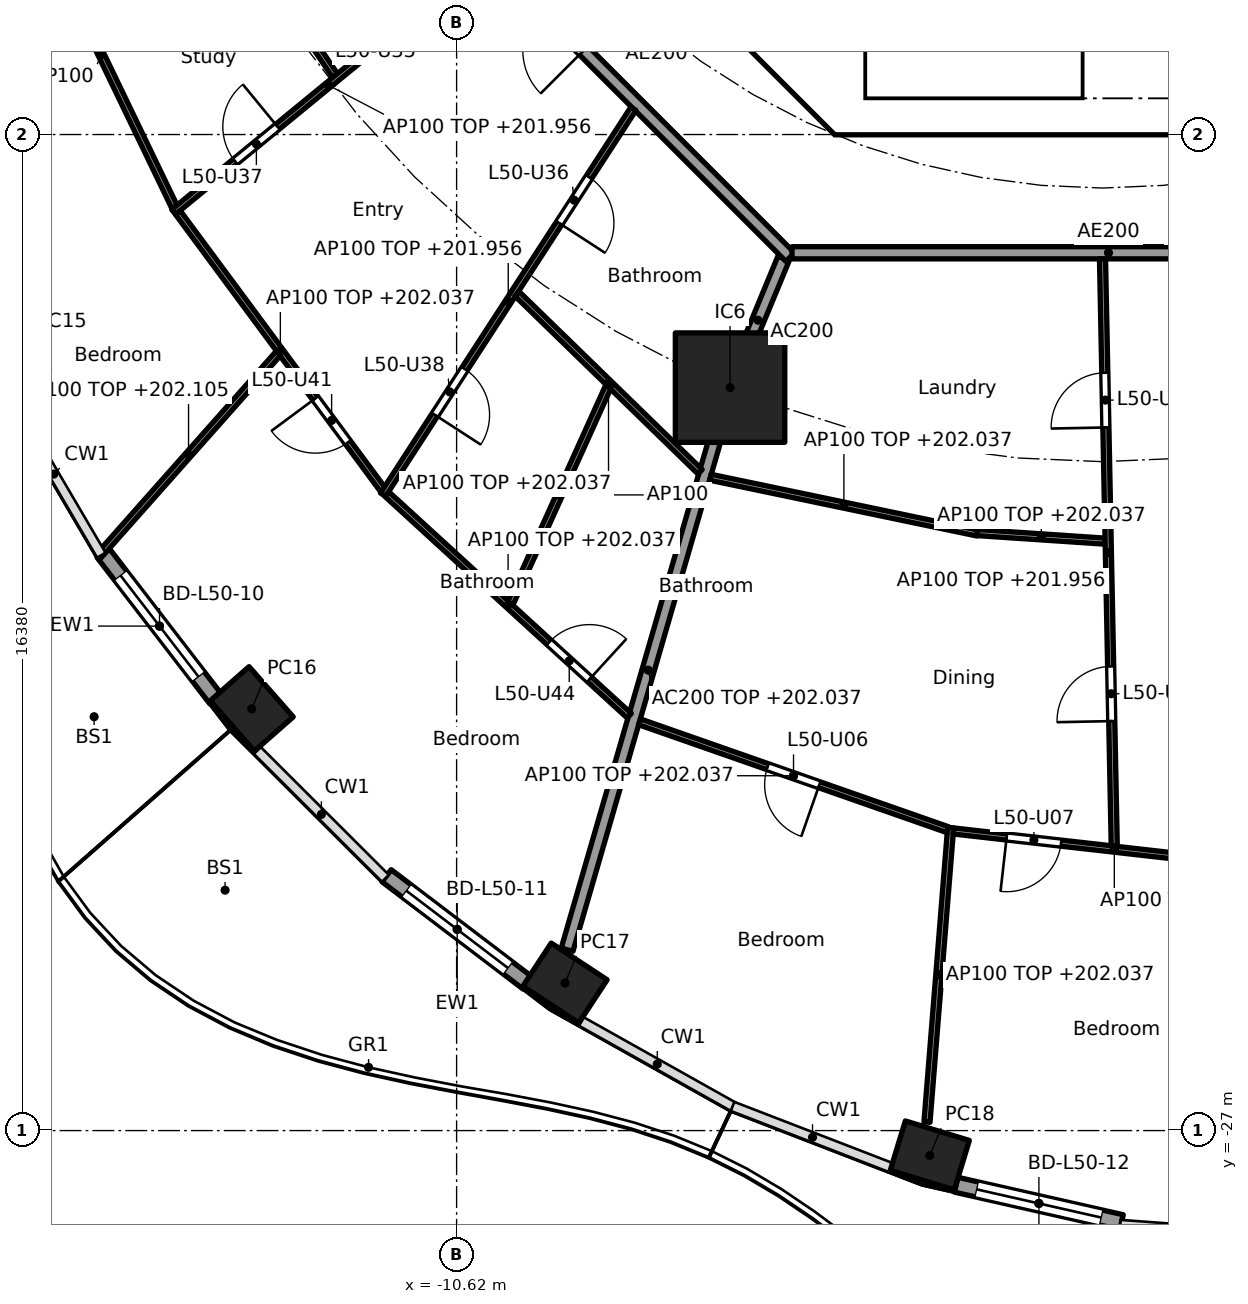
"""IFC4 building model, lengths in metres.
Left out: names, types, materials, properties, quantities, classifications, styles, units other than length and angle.
Written with IfcOpenShell. Run it as: python <this file> out.ifc"""

import sys

from ifc_helpers import new_model, si_unit, direction, frame, frame_2d, origin, origin_2d, place, context, subcontext, project, spatial, polyline, rectangle, hollow_rectangle, outline, extrude, element, fill, save


model = new_model("IFC4")
c1 = context("Model", 3, precision=1e-05, world=origin(), true_north=direction((0.0, 1.0)))
c2 = subcontext(c1, "Body", "Model", "MODEL_VIEW")
j1 = project(units=[si_unit("LENGTHUNIT", "METRE"), si_unit("PLANEANGLEUNIT", "RADIAN")], contexts=[c1])
p1 = place(None, origin())
s1 = spatial("IfcSite", under=j1, at=p1, CompositionType="ELEMENT")
p2 = place(p1, origin())
s2 = spatial("IfcBuilding", under=s1, at=p2, CompositionType="ELEMENT")
p3 = place(p2, frame((0.0, 0.0, 199.2)))
s3 = spatial("IfcBuildingStorey", under=s2, at=p3, CompositionType="ELEMENT", Elevation=199.2)
for number, where, z_axis, x_axis in (
    (1, (-13.989, -20.064, 0.0), (0.0, 0.0, 1.0), (0.66, -0.751, 0.0)),
    (2, (-8.837, -24.573, 0.0), (0.0, 0.0, 1.0), (0.836, -0.549, 0.0)),
    (3, (-2.838, -27.408, 0.0), (0.0, 0.0, 1.0), (0.957, -0.292, 0.0)),
):
    element("IfcColumn", number, at=place(p3, frame(where, z_axis=z_axis, x_axis=x_axis)), inside=s3, PredefinedType="COLUMN", context=c2, shape_type="SweptSolid", body=[
        extrude(hollow_rectangle(XDim=1.1, YDim=0.85, WallThickness=0.036, at=origin_2d()), origin(), (0.0, 0.0, 1.0), 3.7),
    ])
p4 = place(p3, frame((-6.123, -14.782, 0.0), z_axis=(0.0, 0.0, 1.0), x_axis=(1.0, 0.0, 0.0)))
e4 = element("IfcColumn", 4, at=p4, inside=s3, PredefinedType="COLUMN", context=c2, shape_type="SweptSolid", body=[
    extrude(rectangle(XDim=1.8, YDim=1.8, at=origin_2d()), origin(), (0.0, 0.0, 1.0), 3.7),
])
p5 = place(p3, frame((-14.58, -19.906, 0.0), z_axis=(0.0, 0.0, 1.0), x_axis=(-0.610437428894, 0.79206448311, 0.0)))
e5 = element("IfcWall", 5, at=p5, inside=s3, PredefinedType="SOLIDWALL", context=c2, shape_type="SweptSolid", body=[
    extrude(rectangle(XDim=3.035, YDim=0.25, at=frame_2d((1.518, 0.0))), origin(), (0.0, 0.0, 1.0), 3.44),
])
p6 = place(p5, frame((0.468, 0.0, 0.0)))
e6 = element("IfcOpeningElement", 6, at=p6, cuts=e5, PredefinedType="OPENING", context=c2, shape_type="SweptSolid", body=[
    extrude(rectangle(XDim=2.1, YDim=2.4, at=frame_2d((1.05, 1.2))), frame((0.0, 0.135, 0.0), z_axis=(0.0, -1.0, 0.0), x_axis=(1.0, 0.0, 0.0)), (0.0, 0.0, 1.0), 0.27),
])
p7 = place(p3, frame((-9.45, -24.574, 0.0), z_axis=(0.0, 0.0, 1.0), x_axis=(-0.796055733703, 0.60522332146, 0.0)))
e7 = element("IfcWall", 7, at=p7, inside=s3, PredefinedType="SOLIDWALL", context=c2, shape_type="SweptSolid", body=[
    extrude(rectangle(XDim=2.917, YDim=0.25, at=frame_2d((1.458, 0.0))), origin(), (0.0, 0.0, 1.0), 3.44),
])
p8 = place(p7, frame((0.408, 0.0, 0.0)))
e8 = element("IfcOpeningElement", 8, at=p8, cuts=e7, PredefinedType="OPENING", context=c2, shape_type="SweptSolid", body=[
    extrude(rectangle(XDim=2.1, YDim=2.4, at=frame_2d((1.05, 1.2))), frame((0.0, 0.135, 0.0), z_axis=(0.0, -1.0, 0.0), x_axis=(1.0, 0.0, 0.0)), (0.0, 0.0, 1.0), 0.27),
])
p9 = place(p3, frame((0.315, -28.506, 0.0), z_axis=(0.0, 0.0, 1.0), x_axis=(-0.975324329911, 0.220776926974, 0.0)))
e9 = element("IfcWall", 9, at=p9, inside=s3, PredefinedType="SOLIDWALL", context=c2, shape_type="SweptSolid", body=[
    extrude(rectangle(XDim=2.788, YDim=0.25, at=frame_2d((1.394, 0.0))), origin(), (0.0, 0.0, 1.0), 3.44),
])
p10 = place(p9, frame((0.344, 0.0, 0.0)))
e10 = element("IfcOpeningElement", 10, at=p10, cuts=e9, PredefinedType="OPENING", context=c2, shape_type="SweptSolid", body=[
    extrude(rectangle(XDim=2.1, YDim=2.4, at=frame_2d((1.05, 1.2))), frame((0.0, 0.135, 0.0), z_axis=(0.0, -1.0, 0.0), x_axis=(1.0, 0.0, 0.0)), (0.0, 0.0, 1.0), 0.27),
])
p11 = place(p3, frame((-9.988, -4.613, 0.0), z_axis=(0.0, 0.0, 1.0), x_axis=(0.707106781187, -0.707106781187, 0.0)))
e11 = element("IfcWall", 11, at=p11, inside=s3, PredefinedType="SHEAR", context=c2, shape_type="SweptSolid", body=[
    extrude(rectangle(XDim=7.602, YDim=0.6, at=frame_2d((3.801, 0.0))), origin(), (0.0, 0.0, 1.0), 3.44),
])
p12 = place(p11, frame((6.151, 0.0, 0.0)))
e12 = element("IfcOpeningElement", 12, at=p12, cuts=e11, PredefinedType="OPENING", context=c2, shape_type="SweptSolid", body=[
    extrude(rectangle(XDim=1.1, YDim=2.1, at=frame_2d((0.55, 1.05))), frame((0.0, 0.31, 0.0), z_axis=(0.0, -1.0, 0.0), x_axis=(1.0, 0.0, 0.0)), (0.0, 0.0, 1.0), 0.62),
])
p13 = place(p3, origin())
e13 = element("IfcWall", 13, at=p13, inside=s3, PredefinedType="SHEAR", context=c2, shape_type="SweptSolid", body=[
    extrude(outline(polyline([(-4.152, -10.025), (4.152, -10.025), (4.401, -9.776), (4.825, -10.2), (4.401, -10.625), (-4.401, -10.625), (-4.825, -10.2), (-4.401, -9.776), (-4.152, -10.025)])), origin(), (0.0, 0.0, 1.0), 3.44),
])
p14 = place(p3, origin())
e14 = element("IfcWall", 14, at=p14, inside=s3, PredefinedType="SOLIDWALL", context=c2, shape_type="SweptSolid", body=[
    extrude(outline(polyline([(-3.9, -10.025), (-4.1, -10.025), (-4.1, -7.025), (-3.9, -7.025), (-3.9, -10.025)])), origin(), (0.0, 0.0, 1.0), 3.44),
])
p15 = place(p3, frame((-5.243, -12.657, 0.0), z_axis=(0.0, 0.0, 1.0), x_axis=(-0.382707856524, -0.923869415315, 0.0)))
e15 = element("IfcWall", 15, at=p15, inside=s3, PredefinedType="PARTITIONING", context=c2, shape_type="SweptSolid", body=[
    extrude(rectangle(XDim=2.2, YDim=0.2, at=frame_2d((1.1, 0.0))), origin(), (0.0, 0.0, 1.0), 3.44),
])
p16 = place(p3, frame((-6.137, -14.83, 0.0), z_axis=(0.0, 0.0, 1.0), x_axis=(-0.278461169897, -0.96044748782, 0.0)))
e16 = element("IfcWall", 16, at=p16, inside=s3, PredefinedType="PARTITIONING", context=c2, shape_type="SweptSolid", body=[
    extrude(rectangle(XDim=9.573, YDim=0.2, at=frame_2d((4.787, 0.0))), origin(), (0.0, 0.0, 1.0), 2.837),
])
p17 = place(p3, frame((-12.635, -5.134, 0.0), z_axis=(0.0, 0.0, 1.0), x_axis=(0.707106781187, -0.707106781187, 0.0)))
e17 = element("IfcWall", 17, at=p17, inside=s3, PredefinedType="PARTITIONING", context=c2, shape_type="SweptSolid", body=[
    extrude(rectangle(XDim=10.609, YDim=0.2, at=frame_2d((5.305, 0.0))), origin(), (0.0, 0.0, 1.0), 3.44),
])
p18 = place(p17, frame((4.804, 0.0, 0.0)))
e18 = element("IfcOpeningElement", 18, at=p18, cuts=e17, PredefinedType="OPENING", context=c2, shape_type="SweptSolid", body=[
    extrude(rectangle(XDim=1.0, YDim=2.1, at=frame_2d((0.5, 1.05))), frame((0.0, 0.11, 0.0), z_axis=(0.0, -1.0, 0.0), x_axis=(1.0, 0.0, 0.0)), (0.0, 0.0, 1.0), 0.22),
])
p19 = place(p3, frame((-5.104, -12.565, 0.0), z_axis=(0.0, 0.0, 1.0), x_axis=(1.0, 0.0, 0.0)))
e19 = element("IfcWall", 19, at=p19, inside=s3, PredefinedType="PARTITIONING", context=c2, shape_type="SweptSolid", body=[
    extrude(rectangle(XDim=10.409, YDim=0.2, at=frame_2d((5.205, 0.0))), origin(), (0.0, 0.0, 1.0), 3.44),
])
p20 = place(p19, frame((6.339, 0.0, 0.0)))
e20 = element("IfcOpeningElement", 20, at=p20, cuts=e19, PredefinedType="OPENING", context=c2, shape_type="SweptSolid", body=[
    extrude(rectangle(XDim=1.0, YDim=2.1, at=frame_2d((0.5, 1.05))), frame((0.0, 0.11, 0.0), z_axis=(0.0, -1.0, 0.0), x_axis=(1.0, 0.0, 0.0)), (0.0, 0.0, 1.0), 0.22),
])
p21 = place(p3, frame((-14.952, -6.208, 0.0), z_axis=(0.0, 0.0, 1.0), x_axis=(0.561064907171, -0.827771810308, 0.0)))
e21 = element("IfcWall", 21, at=p21, inside=s3, PredefinedType="PARTITIONING", context=c2, shape_type="SweptSolid", body=[
    extrude(rectangle(XDim=4.159, YDim=0.1, at=frame_2d((2.079, 0.0))), origin(), (0.0, 0.0, 1.0), 3.44),
])
p22 = place(p3, frame((-17.669, -6.809, 0.0), z_axis=(0.0, 0.0, 1.0), x_axis=(0.434040130629, -0.900893536997, 0.0)))
e22 = element("IfcWall", 22, at=p22, inside=s3, PredefinedType="PARTITIONING", context=c2, shape_type="SweptSolid", body=[
    extrude(rectangle(XDim=5.558, YDim=0.1, at=frame_2d((2.779, 0.0))), origin(), (0.0, 0.0, 1.0), 3.44),
])
p23 = place(p3, frame((-10.189, -7.721, 0.0), z_axis=(0.0, 0.0, 1.0), x_axis=(-0.773121441079, -0.634258021112, 0.0)))
e23 = element("IfcWall", 23, at=p23, inside=s3, PredefinedType="PARTITIONING", context=c2, shape_type="SweptSolid", body=[
    extrude(rectangle(XDim=6.577, YDim=0.1, at=frame_2d((3.289, 0.0))), origin(), (0.0, 0.0, 1.0), 2.756),
])
p24 = place(p23, frame((1.104, 0.0, 0.0)))
e24 = element("IfcOpeningElement", 24, at=p24, cuts=e23, PredefinedType="OPENING", context=c2, shape_type="SweptSolid", body=[
    extrude(rectangle(XDim=0.9, YDim=2.1, at=frame_2d((0.45, 1.05))), frame((0.0, 0.06, 0.0), z_axis=(0.0, -1.0, 0.0), x_axis=(1.0, 0.0, 0.0)), (0.0, 0.0, 1.0), 0.12),
])
p25 = place(p23, frame((4.367, 0.0, 0.0)))
e25 = element("IfcOpeningElement", 25, at=p25, cuts=e23, PredefinedType="OPENING", context=c2, shape_type="SweptSolid", body=[
    extrude(rectangle(XDim=0.9, YDim=2.1, at=frame_2d((0.45, 1.05))), frame((0.0, 0.06, 0.0), z_axis=(0.0, -1.0, 0.0), x_axis=(1.0, 0.0, 0.0)), (0.0, 0.0, 1.0), 0.12),
])
p26 = place(p3, frame((-15.205, -11.901, 0.0), z_axis=(0.0, 0.0, 1.0), x_axis=(0.594704483906, -0.803944386647, 0.0)))
e26 = element("IfcWall", 26, at=p26, inside=s3, PredefinedType="PARTITIONING", context=c2, shape_type="SweptSolid", body=[
    extrude(rectangle(XDim=5.672, YDim=0.1, at=frame_2d((2.836, 0.0))), origin(), (0.0, 0.0, 1.0), 2.837),
])
p27 = place(p26, frame((3.804, 0.0, 0.0)))
e27 = element("IfcOpeningElement", 27, at=p27, cuts=e26, PredefinedType="OPENING", context=c2, shape_type="SweptSolid", body=[
    extrude(rectangle(XDim=0.9, YDim=2.1, at=frame_2d((0.45, 1.05))), frame((0.0, 0.06, 0.0), z_axis=(0.0, -1.0, 0.0), x_axis=(1.0, 0.0, 0.0)), (0.0, 0.0, 1.0), 0.12),
])
p28 = place(p3, frame((-13.552, -14.219, 0.0), z_axis=(0.0, 0.0, 1.0), x_axis=(-0.663542794709, -0.748138329181, 0.0)))
e28 = element("IfcWall", 28, at=p28, inside=s3, PredefinedType="PARTITIONING", context=c2, shape_type="SweptSolid", body=[
    extrude(rectangle(XDim=4.45, YDim=0.1, at=frame_2d((2.225, 0.0))), origin(), (0.0, 0.0, 1.0), 2.905),
])
p29 = place(p3, frame((-7.712, -10.195, 0.0), z_axis=(0.0, 0.0, 1.0), x_axis=(-0.544179442551, -0.838968851809, 0.0)))
e29 = element("IfcWall", 29, at=p29, inside=s3, PredefinedType="PARTITIONING", context=c2, shape_type="SweptSolid", body=[
    extrude(rectangle(XDim=7.566, YDim=0.1, at=frame_2d((3.783, 0.0))), origin(), (0.0, 0.0, 1.0), 2.756),
])
p30 = place(p29, frame((1.343, 0.0, 0.0)))
e30 = element("IfcOpeningElement", 30, at=p30, cuts=e29, PredefinedType="OPENING", context=c2, shape_type="SweptSolid", body=[
    extrude(rectangle(XDim=0.9, YDim=2.1, at=frame_2d((0.45, 1.05))), frame((0.0, 0.06, 0.0), z_axis=(0.0, -1.0, 0.0), x_axis=(1.0, 0.0, 0.0)), (0.0, 0.0, 1.0), 0.12),
])
p31 = place(p29, frame((5.101, 0.0, 0.0)))
e31 = element("IfcOpeningElement", 31, at=p31, cuts=e29, PredefinedType="OPENING", context=c2, shape_type="SweptSolid", body=[
    extrude(rectangle(XDim=0.9, YDim=2.1, at=frame_2d((0.45, 1.05))), frame((0.0, 0.06, 0.0), z_axis=(0.0, -1.0, 0.0), x_axis=(1.0, 0.0, 0.0)), (0.0, 0.0, 1.0), 0.12),
])
p32 = place(p3, frame((-9.627, -13.238, 0.0), z_axis=(0.0, 0.0, 1.0), x_axis=(0.716919058692, -0.697156412352, 0.0)))
e32 = element("IfcWall", 32, at=p32, inside=s3, PredefinedType="PARTITIONING", context=c2, shape_type="SweptSolid", body=[
    extrude(rectangle(XDim=4.2, YDim=0.1, at=frame_2d((2.1, 0.0))), origin(), (0.0, 0.0, 1.0), 2.837),
])
p33 = place(p3, frame((-11.766, -16.535, 0.0), z_axis=(0.0, 0.0, 1.0), x_axis=(0.73807320557, -0.674720640872, 0.0)))
e33 = element("IfcWall", 33, at=p33, inside=s3, PredefinedType="PARTITIONING", context=c2, shape_type="SweptSolid", body=[
    extrude(rectangle(XDim=5.399, YDim=0.1, at=frame_2d((2.699, 0.0))), origin(), (0.0, 0.0, 1.0), 2.837),
])
p34 = place(p33, frame((3.612, 0.0, 0.0)))
e34 = element("IfcOpeningElement", 34, at=p34, cuts=e33, PredefinedType="OPENING", context=c2, shape_type="SweptSolid", body=[
    extrude(rectangle(XDim=0.9, YDim=2.1, at=frame_2d((0.45, 1.05))), frame((0.0, 0.06, 0.0), z_axis=(0.0, -1.0, 0.0), x_axis=(1.0, 0.0, 0.0)), (0.0, 0.0, 1.0), 0.12),
])
p35 = place(p3, frame((-8.125, -14.765, 0.0), z_axis=(0.0, 0.0, 1.0), x_axis=(-0.411745679848, -0.911298795745, 0.0)))
e35 = element("IfcWall", 35, at=p35, inside=s3, PredefinedType="PARTITIONING", context=c2, shape_type="SweptSolid", body=[
    extrude(rectangle(XDim=3.909, YDim=0.1, at=frame_2d((1.955, 0.0))), origin(), (0.0, 0.0, 1.0), 3.44),
])
p36 = place(p3, frame((-6.447, -16.256, 0.0), z_axis=(0.0, 0.0, 1.0), x_axis=(0.978902917122, -0.20432591331, 0.0)))
e36 = element("IfcWall", 36, at=p36, inside=s3, PredefinedType="PARTITIONING", context=c2, shape_type="SweptSolid", body=[
    extrude(rectangle(XDim=4.486, YDim=0.1, at=frame_2d((2.243, 0.0))), origin(), (0.0, 0.0, 1.0), 2.837),
])
p37 = place(p3, frame((-7.613, -20.278, 0.0), z_axis=(0.0, 0.0, 1.0), x_axis=(0.94391294884, -0.330194404878, 0.0)))
e37 = element("IfcWall", 37, at=p37, inside=s3, PredefinedType="PARTITIONING", context=c2, shape_type="SweptSolid", body=[
    extrude(rectangle(XDim=5.367, YDim=0.1, at=frame_2d((2.684, 0.0))), origin(), (0.0, 0.0, 1.0), 2.837),
])
p38 = place(p37, frame((2.234, 0.0, 0.0)))
e38 = element("IfcOpeningElement", 38, at=p38, cuts=e37, PredefinedType="OPENING", context=c2, shape_type="SweptSolid", body=[
    extrude(rectangle(XDim=0.9, YDim=2.1, at=frame_2d((0.45, 1.05))), frame((0.0, 0.06, 0.0), z_axis=(0.0, -1.0, 0.0), x_axis=(1.0, 0.0, 0.0)), (0.0, 0.0, 1.0), 0.12),
])
p39 = place(p3, frame((-2.055, -17.166, 0.0), z_axis=(0.0, 0.0, 1.0), x_axis=(0.997756833447, -0.06694252243, 0.0)))
e39 = element("IfcWall", 39, at=p39, inside=s3, PredefinedType="PARTITIONING", context=c2, shape_type="SweptSolid", body=[
    extrude(rectangle(XDim=2.104, YDim=0.1, at=frame_2d((1.052, 0.0))), origin(), (0.0, 0.0, 1.0), 2.837),
])
p40 = place(p3, frame((-2.495, -22.017, 0.0), z_axis=(0.0, 0.0, 1.0), x_axis=(-0.080150660566, -0.99678276049, 0.0)))
e40 = element("IfcWall", 40, at=p40, inside=s3, PredefinedType="PARTITIONING", context=c2, shape_type="SweptSolid", body=[
    extrude(rectangle(XDim=4.858, YDim=0.1, at=frame_2d((2.429, 0.0))), origin(), (0.0, 0.0, 1.0), 2.837),
])
p41 = place(p3, frame((-2.449, -22.073, 0.0), z_axis=(0.0, 0.0, 1.0), x_axis=(0.993660315081, -0.112424099879, 0.0)))
e41 = element("IfcWall", 41, at=p41, inside=s3, PredefinedType="PARTITIONING", context=c2, shape_type="SweptSolid", body=[
    extrude(rectangle(XDim=5.325, YDim=0.1, at=frame_2d((2.662, 0.0))), origin(), (0.0, 0.0, 1.0), 2.837),
])
p42 = place(p41, frame((0.881, 0.0, 0.0)))
e42 = element("IfcOpeningElement", 42, at=p42, cuts=e41, PredefinedType="OPENING", context=c2, shape_type="SweptSolid", body=[
    extrude(rectangle(XDim=0.9, YDim=2.1, at=frame_2d((0.45, 1.05))), frame((0.0, 0.06, 0.0), z_axis=(0.0, -1.0, 0.0), x_axis=(1.0, 0.0, 0.0)), (0.0, 0.0, 1.0), 0.12),
])
p43 = place(p3, frame((0.002, -12.665, 0.0), z_axis=(0.0, 0.0, 1.0), x_axis=(0.019992969345, -0.999800120613, 0.0)))
e43 = element("IfcWall", 43, at=p43, inside=s3, PredefinedType="PARTITIONING", context=c2, shape_type="SweptSolid", body=[
    extrude(rectangle(XDim=9.659, YDim=0.1, at=frame_2d((4.83, 0.0))), origin(), (0.0, 0.0, 1.0), 2.756),
])
p44 = place(p43, frame((1.873, 0.0, 0.0)))
e44 = element("IfcOpeningElement", 44, at=p44, cuts=e43, PredefinedType="OPENING", context=c2, shape_type="SweptSolid", body=[
    extrude(rectangle(XDim=0.9, YDim=2.1, at=frame_2d((0.45, 1.05))), frame((0.0, 0.06, 0.0), z_axis=(0.0, -1.0, 0.0), x_axis=(1.0, 0.0, 0.0)), (0.0, 0.0, 1.0), 0.12),
])
p45 = place(p43, frame((6.703, 0.0, 0.0)))
e45 = element("IfcOpeningElement", 45, at=p45, cuts=e43, PredefinedType="OPENING", context=c2, shape_type="SweptSolid", body=[
    extrude(rectangle(XDim=0.9, YDim=2.1, at=frame_2d((0.45, 1.05))), frame((0.0, 0.06, 0.0), z_axis=(0.0, -1.0, 0.0), x_axis=(1.0, 0.0, 0.0)), (0.0, 0.0, 1.0), 0.12),
])
p46 = place(p6, origin())
e46 = element("IfcDoor", 46, at=p46, inside=s3, OperationType="SLIDING_TO_LEFT", PredefinedType="DOOR", context=c2, shape_type="SweptSolid", body=[
    extrude(rectangle(XDim=2.1, YDim=2.4, at=frame_2d((1.05, 1.2))), frame((0.0, 0.025, 0.0), z_axis=(0.0, -1.0, 0.0), x_axis=(1.0, 0.0, 0.0)), (0.0, 0.0, 1.0), 0.05),
])
fill(e6, e46)
p47 = place(p8, origin())
e47 = element("IfcDoor", 47, at=p47, inside=s3, OperationType="SLIDING_TO_LEFT", PredefinedType="DOOR", context=c2, shape_type="SweptSolid", body=[
    extrude(rectangle(XDim=2.1, YDim=2.4, at=frame_2d((1.05, 1.2))), frame((0.0, 0.025, 0.0), z_axis=(0.0, -1.0, 0.0), x_axis=(1.0, 0.0, 0.0)), (0.0, 0.0, 1.0), 0.05),
])
fill(e8, e47)
p48 = place(p10, origin())
e48 = element("IfcDoor", 48, at=p48, inside=s3, OperationType="SLIDING_TO_LEFT", PredefinedType="DOOR", context=c2, shape_type="SweptSolid", body=[
    extrude(rectangle(XDim=2.1, YDim=2.4, at=frame_2d((1.05, 1.2))), frame((0.0, 0.025, 0.0), z_axis=(0.0, -1.0, 0.0), x_axis=(1.0, 0.0, 0.0)), (0.0, 0.0, 1.0), 0.05),
])
fill(e10, e48)
p49 = place(p12, origin())
e49 = element("IfcDoor", 49, at=p49, inside=s3, OperationType="SINGLE_SWING_RIGHT", PredefinedType="DOOR", context=c2, shape_type="SweptSolid", body=[
    extrude(rectangle(XDim=1.1, YDim=2.1, at=frame_2d((0.55, 1.05))), frame((0.0, 0.025, 0.0), z_axis=(0.0, -1.0, 0.0), x_axis=(1.0, 0.0, 0.0)), (0.0, 0.0, 1.0), 0.05),
])
fill(e12, e49)
p50 = place(p44, frame((0.9, 0.0, 0.0), x_axis=(-1.0, 0.0, 0.0)))
e50 = element("IfcDoor", 50, at=p50, inside=s3, OperationType="SINGLE_SWING_LEFT", PredefinedType="DOOR", context=c2, shape_type="SweptSolid", body=[
    extrude(rectangle(XDim=0.9, YDim=2.1, at=frame_2d((0.45, 1.05))), frame((0.0, 0.025, 0.0), z_axis=(0.0, -1.0, 0.0), x_axis=(1.0, 0.0, 0.0)), (0.0, 0.0, 1.0), 0.05),
])
fill(e44, e50)
p51 = place(p45, frame((0.9, 0.0, 0.0), x_axis=(-1.0, 0.0, 0.0)))
e51 = element("IfcDoor", 51, at=p51, inside=s3, OperationType="SINGLE_SWING_LEFT", PredefinedType="DOOR", context=c2, shape_type="SweptSolid", body=[
    extrude(rectangle(XDim=0.9, YDim=2.1, at=frame_2d((0.45, 1.05))), frame((0.0, 0.025, 0.0), z_axis=(0.0, -1.0, 0.0), x_axis=(1.0, 0.0, 0.0)), (0.0, 0.0, 1.0), 0.05),
])
fill(e45, e51)
p52 = place(p38, frame((0.9, 0.0, 0.0), x_axis=(-1.0, 0.0, 0.0)))
e52 = element("IfcDoor", 52, at=p52, inside=s3, OperationType="SINGLE_SWING_LEFT", PredefinedType="DOOR", context=c2, shape_type="SweptSolid", body=[
    extrude(rectangle(XDim=0.9, YDim=2.1, at=frame_2d((0.45, 1.05))), frame((0.0, 0.025, 0.0), z_axis=(0.0, -1.0, 0.0), x_axis=(1.0, 0.0, 0.0)), (0.0, 0.0, 1.0), 0.05),
])
fill(e38, e52)
p53 = place(p42, frame((0.9, 0.0, 0.0), x_axis=(-1.0, 0.0, 0.0)))
e53 = element("IfcDoor", 53, at=p53, inside=s3, OperationType="SINGLE_SWING_RIGHT", PredefinedType="DOOR", context=c2, shape_type="SweptSolid", body=[
    extrude(rectangle(XDim=0.9, YDim=2.1, at=frame_2d((0.45, 1.05))), frame((0.0, 0.025, 0.0), z_axis=(0.0, -1.0, 0.0), x_axis=(1.0, 0.0, 0.0)), (0.0, 0.0, 1.0), 0.05),
])
fill(e42, e53)
p54 = place(p30, origin())
e54 = element("IfcDoor", 54, at=p54, inside=s3, OperationType="SINGLE_SWING_RIGHT", PredefinedType="DOOR", context=c2, shape_type="SweptSolid", body=[
    extrude(rectangle(XDim=0.9, YDim=2.1, at=frame_2d((0.45, 1.05))), frame((0.0, 0.025, 0.0), z_axis=(0.0, -1.0, 0.0), x_axis=(1.0, 0.0, 0.0)), (0.0, 0.0, 1.0), 0.05),
])
fill(e30, e54)
p55 = place(p25, frame((0.9, 0.0, 0.0), x_axis=(-1.0, 0.0, 0.0)))
e55 = element("IfcDoor", 55, at=p55, inside=s3, OperationType="SINGLE_SWING_RIGHT", PredefinedType="DOOR", context=c2, shape_type="SweptSolid", body=[
    extrude(rectangle(XDim=0.9, YDim=2.1, at=frame_2d((0.45, 1.05))), frame((0.0, 0.025, 0.0), z_axis=(0.0, -1.0, 0.0), x_axis=(1.0, 0.0, 0.0)), (0.0, 0.0, 1.0), 0.05),
])
fill(e25, e55)
p56 = place(p31, origin())
e56 = element("IfcDoor", 56, at=p56, inside=s3, OperationType="SINGLE_SWING_RIGHT", PredefinedType="DOOR", context=c2, shape_type="SweptSolid", body=[
    extrude(rectangle(XDim=0.9, YDim=2.1, at=frame_2d((0.45, 1.05))), frame((0.0, 0.025, 0.0), z_axis=(0.0, -1.0, 0.0), x_axis=(1.0, 0.0, 0.0)), (0.0, 0.0, 1.0), 0.05),
])
fill(e31, e56)
p57 = place(p27, frame((0.9, 0.0, 0.0), x_axis=(-1.0, 0.0, 0.0)))
e57 = element("IfcDoor", 57, at=p57, inside=s3, OperationType="SINGLE_SWING_RIGHT", PredefinedType="DOOR", context=c2, shape_type="SweptSolid", body=[
    extrude(rectangle(XDim=0.9, YDim=2.1, at=frame_2d((0.45, 1.05))), frame((0.0, 0.025, 0.0), z_axis=(0.0, -1.0, 0.0), x_axis=(1.0, 0.0, 0.0)), (0.0, 0.0, 1.0), 0.05),
])
fill(e27, e57)
p58 = place(p34, origin())
e58 = element("IfcDoor", 58, at=p58, inside=s3, OperationType="SINGLE_SWING_RIGHT", PredefinedType="DOOR", context=c2, shape_type="SweptSolid", body=[
    extrude(rectangle(XDim=0.9, YDim=2.1, at=frame_2d((0.45, 1.05))), frame((0.0, 0.025, 0.0), z_axis=(0.0, -1.0, 0.0), x_axis=(1.0, 0.0, 0.0)), (0.0, 0.0, 1.0), 0.05),
])
fill(e34, e58)
save(model, sys.argv[1])
